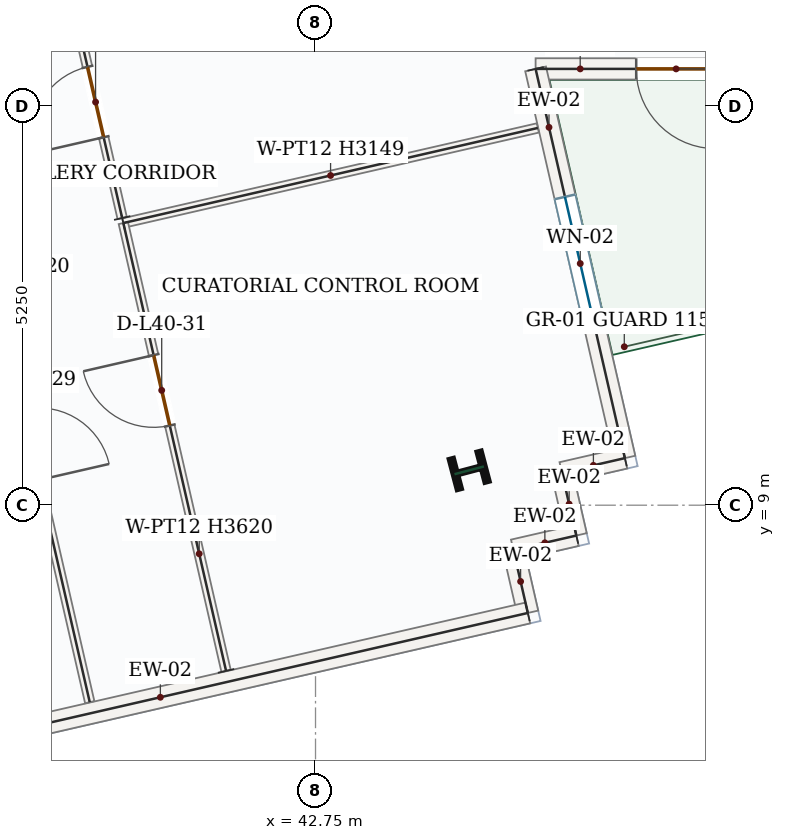
"""IFC4 building model, lengths in metres.
Left out: names, types, materials, properties, quantities, classifications, styles, units other than length and angle.
Written with IfcOpenShell. Run it as: python <this file> out.ifc"""

import sys

from ifc_helpers import new_model, si_unit, direction, frame, frame_2d, origin, origin_2d, place, context, subcontext, project, spatial, rectangle, i_section, extrude, source, transform, mapped, element, fill, save


model = new_model("IFC4")
c1 = context("Model", 3, precision=1e-05, world=origin(), true_north=direction((0.0, 1.0)))
c2 = subcontext(c1, "Body", "Model", "MODEL_VIEW")
j1 = project(units=[si_unit("LENGTHUNIT", "METRE"), si_unit("PLANEANGLEUNIT", "RADIAN")], contexts=[c1])
p1 = place(None, origin())
s1 = spatial("IfcSite", under=j1, at=p1, CompositionType="ELEMENT")
p2 = place(p1, origin())
s2 = spatial("IfcBuilding", under=s1, at=p2, CompositionType="ELEMENT")
p3 = place(p2, frame((0.0, 0.0, 174.6)))
s3 = spatial("IfcBuildingStorey", under=s2, at=p3, CompositionType="ELEMENT", Elevation=174.6)
m1 = source(origin(), c2, "Body", "SweptSolid", [
    extrude(i_section(OverallWidth=0.412, OverallDepth=0.435, WebThickness=0.036, FlangeThickness=0.057, FilletRadius=0.018, at=origin_2d()), origin(), (0.0, 0.0, 1.0), 3.9),
])
p4 = place(p3, frame((44.772, 9.459, 0.0), z_axis=(0.0, 0.0, 1.0), x_axis=(-0.255445757936, 0.966823388604, 0.0)))
e1 = element("IfcColumn", 1, at=p4, inside=s3, PredefinedType="COLUMN", context=c2, shape_type="MappedRepresentation", body=[
    mapped(m1, transform((0.0, 0.0, 0.0), x_axis=(1.0, 0.0, 0.0), y_axis=(0.0, 1.0, 0.0), z_axis=(0.0, 0.0, 1.0), scale=1.0)),
])
p5 = place(p3, frame((49.342, 14.74, 0.0), z_axis=(0.0, 0.0, 1.0), x_axis=(-1.0, 0.0, 0.0)))
e2 = element("IfcWall", 2, at=p5, inside=s3, PredefinedType="SOLIDWALL", context=c2, shape_type="SweptSolid", body=[
    extrude(rectangle(XDim=3.697, YDim=0.28, at=frame_2d((1.848, 0.0))), origin(), (0.0, 0.0, 1.0), 3.62),
])
p6 = place(p5, frame((1.323, 0.0, 0.0)))
e3 = element("IfcOpeningElement", 3, at=p6, cuts=e2, PredefinedType="OPENING", context=c2, shape_type="SweptSolid", body=[
    extrude(rectangle(XDim=1.05, YDim=2.15, at=frame_2d((0.525, 1.075))), frame((0.0, 0.15, 0.0), z_axis=(0.0, -1.0, 0.0), x_axis=(1.0, 0.0, 0.0)), (0.0, 0.0, 1.0), 0.3),
])
p7 = place(p3, frame((45.646, 14.74, 0.0), z_axis=(0.0, 0.0, 1.0), x_axis=(0.223562871808, -0.974689510741, 0.0)))
e4 = element("IfcWall", 4, at=p7, inside=s3, PredefinedType="SOLIDWALL", context=c2, shape_type="SweptSolid", body=[
    extrude(rectangle(XDim=5.254, YDim=0.28, at=frame_2d((2.627, 0.0))), origin(), (0.0, 0.0, 1.0), 3.62),
])
p8 = place(p7, frame((1.727, 0.0, 0.85)))
e5 = element("IfcOpeningElement", 5, at=p8, cuts=e4, PredefinedType="OPENING", context=c2, shape_type="SweptSolid", body=[
    extrude(rectangle(XDim=1.8, YDim=1.75, at=frame_2d((0.9, 0.875))), frame((0.0, 0.15, 0.0), z_axis=(0.0, -1.0, 0.0), x_axis=(1.0, 0.0, 0.0)), (0.0, 0.0, 1.0), 0.3),
])
m2 = source(origin(), c2, "Body", "SweptSolid", [
    extrude(rectangle(XDim=0.85, YDim=0.28, at=frame_2d((0.425, 0.0))), origin(), (0.0, 0.0, 1.0), 3.62),
])
p9 = place(p3, frame((46.82, 9.619, 0.0), z_axis=(0.0, 0.0, 1.0), x_axis=(-0.974704946586, -0.223495563939, 0.0)))
e6 = element("IfcWall", 6, at=p9, inside=s3, PredefinedType="SOLIDWALL", context=c2, shape_type="MappedRepresentation", body=[
    mapped(m2, transform((0.0, 0.0, 0.0), x_axis=(1.0, 0.0, 0.0), y_axis=(0.0, 1.0, 0.0), z_axis=(0.0, 0.0, 1.0), scale=1.0)),
])
m3 = source(origin(), c2, "Body", "SweptSolid", [
    extrude(rectangle(XDim=0.85, YDim=0.28, at=frame_2d((0.425, 0.0))), origin(), (0.0, 0.0, 1.0), 3.62),
])
for number, where, z_axis, x_axis in (
    (7, (45.992, 9.429, 0.0), (0.0, 0.0, 1.0), (0.223, -0.975, 0.0)),
    (8, (46.182, 8.601, 0.0), (0.0, 0.0, 1.0), (-0.975, -0.223, 0.0)),
):
    element("IfcWall", number, at=place(p3, frame(where, z_axis=z_axis, x_axis=x_axis)), inside=s3, PredefinedType="SOLIDWALL", context=c2, shape_type="MappedRepresentation", body=[
        mapped(m3, transform((0.0, 0.0, 0.0), x_axis=(1.0, 0.0, 0.0), y_axis=(0.0, 1.0, 0.0), z_axis=(0.0, 0.0, 1.0), scale=1.0)),
    ])
p10 = place(p3, frame((45.353, 8.411, 0.0), z_axis=(0.0, 0.0, 1.0), x_axis=(0.223768457828, -0.974642333003, 0.0)))
e9 = element("IfcWall", 9, at=p10, inside=s3, PredefinedType="SOLIDWALL", context=c2, shape_type="MappedRepresentation", body=[
    mapped(m2, transform((0.0, 0.0, 0.0), x_axis=(1.0, 0.0, 0.0), y_axis=(0.0, 1.0, 0.0), z_axis=(0.0, 0.0, 1.0), scale=1.0)),
])
m4 = source(origin(), c2, "Body", "SweptSolid", [
    extrude(rectangle(XDim=9.92, YDim=0.28, at=frame_2d((4.96, 0.0))), origin(), (0.0, 0.0, 1.0), 3.62),
])
p11 = place(p3, frame((45.543, 7.582, 0.0), z_axis=(0.0, 0.0, 1.0), x_axis=(-0.974682391567, -0.223593907719, 0.0)))
e10 = element("IfcWall", 10, at=p11, inside=s3, PredefinedType="SOLIDWALL", context=c2, shape_type="MappedRepresentation", body=[
    mapped(m4, transform((0.0, 0.0, 0.0), x_axis=(1.0, 0.0, 0.0), y_axis=(0.0, 1.0, 0.0), z_axis=(0.0, 0.0, 1.0), scale=1.0)),
])
m5 = source(origin(), c2, "Body", "SweptSolid", [
    extrude(rectangle(XDim=5.595, YDim=0.125, at=frame_2d((2.797, 0.0))), origin(), (0.0, 0.0, 1.0), 3.149),
])
p12 = place(p3, frame((40.221, 12.712, 0.0), z_axis=(0.0, 0.0, 1.0), x_axis=(0.974683801791, 0.223587760235, 0.0)))
e11 = element("IfcWall", 11, at=p12, inside=s3, PredefinedType="PARTITIONING", context=c2, shape_type="MappedRepresentation", body=[
    mapped(m5, transform((0.0, 0.0, 0.0), x_axis=(1.0, 0.0, 0.0), y_axis=(0.0, 1.0, 0.0), z_axis=(0.0, 0.0, 1.0), scale=1.0)),
])
p13 = place(p3, frame((41.573, 6.82, 0.0), z_axis=(0.0, 0.0, 1.0), x_axis=(-0.223588000718, 0.974683746625, 0.0)))
e12 = element("IfcWall", 12, at=p13, inside=s3, PredefinedType="PARTITIONING", context=c2, shape_type="SweptSolid", body=[
    extrude(rectangle(XDim=6.045, YDim=0.125, at=frame_2d((3.022, 0.0))), origin(), (0.0, 0.0, 1.0), 3.62),
])
p14 = place(p13, frame((3.312, 0.0, 0.0)))
e13 = element("IfcOpeningElement", 13, at=p14, cuts=e12, PredefinedType="OPENING", context=c2, shape_type="SweptSolid", body=[
    extrude(rectangle(XDim=0.95, YDim=2.15, at=frame_2d((0.475, 1.075))), frame((0.0, 0.073, 0.0), z_axis=(0.0, -1.0, 0.0), x_axis=(1.0, 0.0, 0.0)), (0.0, 0.0, 1.0), 0.145),
])
p15 = place(p3, frame((40.206, 12.778, 0.0), z_axis=(0.0, 0.0, 1.0), x_axis=(-0.223552104445, 0.97469198037, 0.0)))
e14 = element("IfcWall", 14, at=p15, inside=s3, PredefinedType="PARTITIONING", context=c2, shape_type="SweptSolid", body=[
    extrude(rectangle(XDim=4.065, YDim=0.125, at=frame_2d((2.032, 0.0))), origin(), (0.0, 0.0, 1.0), 3.62),
])
p16 = place(p15, frame((1.09, 0.0, 0.0)))
e15 = element("IfcOpeningElement", 15, at=p16, cuts=e14, PredefinedType="OPENING", context=c2, shape_type="SweptSolid", body=[
    extrude(rectangle(XDim=0.95, YDim=2.15, at=frame_2d((0.475, 1.075))), frame((0.0, 0.073, 0.0), z_axis=(0.0, -1.0, 0.0), x_axis=(1.0, 0.0, 0.0)), (0.0, 0.0, 1.0), 0.145),
])
p17 = place(p3, frame((38.227, 13.178, 0.0), z_axis=(0.0, 0.0, 1.0), x_axis=(0.223573066544, -0.974687172336, 0.0)))
e16 = element("IfcWall", 16, at=p17, inside=s3, PredefinedType="PARTITIONING", context=c2, shape_type="SweptSolid", body=[
    extrude(rectangle(XDim=6.945, YDim=0.125, at=frame_2d((3.473, 0.0))), origin(), (0.0, 0.0, 1.0), 3.62),
])
p18 = place(p17, frame((2.998, 0.0, 0.0)))
e17 = element("IfcOpeningElement", 17, at=p18, cuts=e16, PredefinedType="OPENING", context=c2, shape_type="SweptSolid", body=[
    extrude(rectangle(XDim=0.95, YDim=2.15, at=frame_2d((0.475, 1.075))), frame((0.0, 0.073, 0.0), z_axis=(0.0, -1.0, 0.0), x_axis=(1.0, 0.0, 0.0)), (0.0, 0.0, 1.0), 0.145),
])
m6 = source(origin(), c2, "Body", "SweptSolid", [
    extrude(rectangle(XDim=1.05, YDim=2.15, at=frame_2d((0.525, 1.075))), frame((0.0, 0.025, 0.0), z_axis=(0.0, -1.0, 0.0), x_axis=(1.0, 0.0, 0.0)), (0.0, 0.0, 1.0), 0.05),
])
p19 = place(p6, origin())
e18 = element("IfcDoor", 18, at=p19, inside=s3, OperationType="SINGLE_SWING_LEFT", PredefinedType="DOOR", context=c2, shape_type="MappedRepresentation", body=[
    mapped(m6, transform((0.0, 0.0, 0.0), x_axis=(1.0, 0.0, 0.0), y_axis=(0.0, 1.0, 0.0), z_axis=(0.0, 0.0, 1.0), scale=1.0)),
])
fill(e3, e18)
m7 = source(origin(), c2, "Body", "SweptSolid", [
    extrude(rectangle(XDim=1.8, YDim=1.75, at=frame_2d((0.9, 0.875))), frame((0.0, 0.03, 0.0), z_axis=(0.0, -1.0, 0.0), x_axis=(1.0, 0.0, 0.0)), (0.0, 0.0, 1.0), 0.06),
])
p20 = place(p8, origin())
e19 = element("IfcWindow", 19, at=p20, inside=s3, PartitioningType="DOUBLE_PANEL_VERTICAL", PredefinedType="WINDOW", context=c2, shape_type="MappedRepresentation", body=[
    mapped(m7, transform((0.0, 0.0, 0.0), x_axis=(1.0, 0.0, 0.0), y_axis=(0.0, 1.0, 0.0), z_axis=(0.0, 0.0, 1.0), scale=1.0)),
])
fill(e5, e19)
m8 = source(origin(), c2, "Body", "SweptSolid", [
    extrude(rectangle(XDim=0.95, YDim=2.15, at=frame_2d((0.475, 1.075))), frame((0.0, 0.025, 0.0), z_axis=(0.0, -1.0, 0.0), x_axis=(1.0, 0.0, 0.0)), (0.0, 0.0, 1.0), 0.05),
])
p21 = place(p16, origin())
e20 = element("IfcDoor", 20, at=p21, inside=s3, OperationType="SINGLE_SWING_LEFT", PredefinedType="DOOR", context=c2, shape_type="MappedRepresentation", body=[
    mapped(m8, transform((0.0, 0.0, 0.0), x_axis=(1.0, 0.0, 0.0), y_axis=(0.0, 1.0, 0.0), z_axis=(0.0, 0.0, 1.0), scale=1.0)),
])
fill(e15, e20)
p22 = place(p14, origin())
e21 = element("IfcDoor", 21, at=p22, inside=s3, OperationType="SINGLE_SWING_RIGHT", PredefinedType="DOOR", context=c2, shape_type="MappedRepresentation", body=[
    mapped(m8, transform((0.0, 0.0, 0.0), x_axis=(1.0, 0.0, 0.0), y_axis=(0.0, 1.0, 0.0), z_axis=(0.0, 0.0, 1.0), scale=1.0)),
])
fill(e13, e21)
save(model, sys.argv[1])
